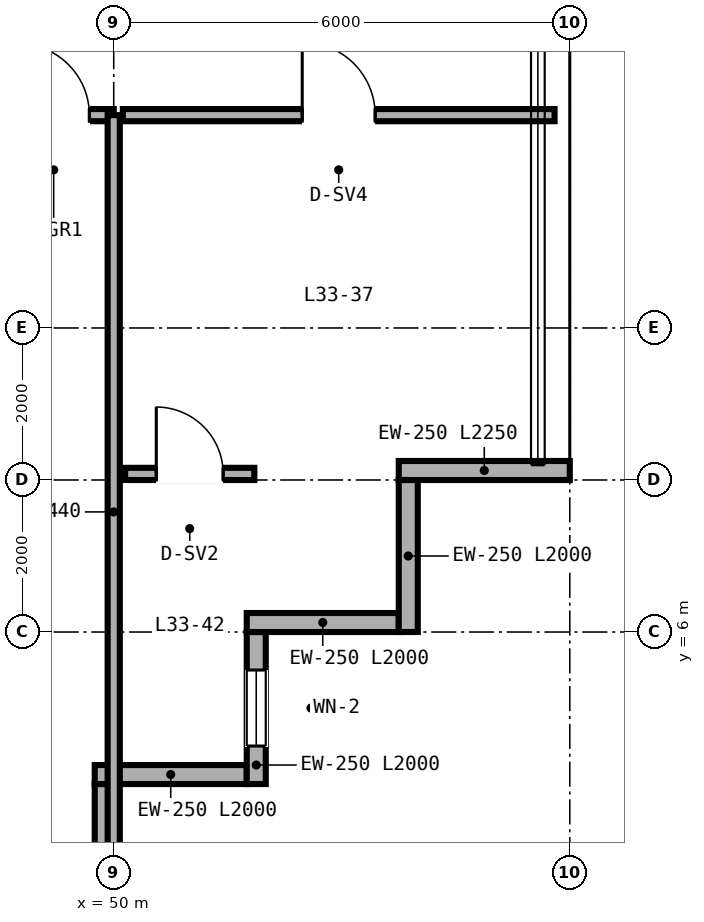
"""IFC4 building model, lengths in metres.
Left out: names, types, materials, properties, quantities, classifications, styles, units other than length and angle.
Written with IfcOpenShell. Run it as: python <this file> out.ifc"""

import sys

from ifc_helpers import new_model, si_unit, direction, frame, frame_2d, origin, place, context, subcontext, project, spatial, rectangle, extrude, source, transform, mapped, element, fill, save


model = new_model("IFC4")
c1 = context("Model", 3, precision=1e-05, world=origin(), true_north=direction((0.0, 1.0)))
c2 = subcontext(c1, "Body", "Model", "MODEL_VIEW")
j1 = project(units=[si_unit("LENGTHUNIT", "METRE"), si_unit("PLANEANGLEUNIT", "RADIAN")], contexts=[c1])
p1 = place(None, origin())
s1 = spatial("IfcSite", under=j1, at=p1, CompositionType="ELEMENT")
p2 = place(p1, origin())
s2 = spatial("IfcBuilding", under=s1, at=p2, CompositionType="ELEMENT")
p3 = place(p2, frame((0.0, 0.0, 133.2)))
s3 = spatial("IfcBuildingStorey", under=s2, at=p3, CompositionType="ELEMENT", Elevation=133.2)
p4 = place(p3, frame((49.875, 2.0, 0.0), z_axis=(0.0, 0.0, 1.0), x_axis=(0.0, 1.0, 0.0)))
e1 = element("IfcWall", 1, at=p4, inside=s3, PredefinedType="SOLIDWALL", context=c2, shape_type="SweptSolid", body=[
    extrude(rectangle(XDim=2.0, YDim=0.25, at=frame_2d((1.0, 0.0))), origin(), (0.0, 0.0, 1.0), 2.667),
])
p5 = place(p3, frame((49.75, 4.125, 0.0), z_axis=(0.0, 0.0, 1.0), x_axis=(1.0, 0.0, 0.0)))
e2 = element("IfcWall", 2, at=p5, inside=s3, PredefinedType="SOLIDWALL", context=c2, shape_type="SweptSolid", body=[
    extrude(rectangle(XDim=2.0, YDim=0.25, at=frame_2d((1.0, 0.0))), origin(), (0.0, 0.0, 1.0), 3.36),
])
p6 = place(p3, frame((51.875, 4.0, 0.0), z_axis=(0.0, 0.0, 1.0), x_axis=(0.0, 1.0, 0.0)))
e3 = element("IfcWall", 3, at=p6, inside=s3, PredefinedType="SOLIDWALL", context=c2, shape_type="SweptSolid", body=[
    extrude(rectangle(XDim=2.0, YDim=0.25, at=frame_2d((1.0, 0.0))), origin(), (0.0, 0.0, 1.0), 3.36),
])
p7 = place(p6, frame((0.5, 0.0, 0.85)))
e4 = element("IfcOpeningElement", 4, at=p7, cuts=e3, PredefinedType="OPENING", context=c2, shape_type="SweptSolid", body=[
    extrude(rectangle(XDim=1.0, YDim=1.9, at=frame_2d((0.5, 0.95))), frame((0.0, 0.135, 0.0), z_axis=(0.0, -1.0, 0.0), x_axis=(1.0, 0.0, 0.0)), (0.0, 0.0, 1.0), 0.27),
])
for number, where, z_axis, x_axis in (
    (5, (51.75, 6.125, 0.0), (0.0, 0.0, 1.0), (1.0, 0.0, 0.0)),
    (6, (53.875, 6.0, 0.0), (0.0, 0.0, 1.0), (0.0, 1.0, 0.0)),
):
    element("IfcWall", number, at=place(p3, frame(where, z_axis=z_axis, x_axis=x_axis)), inside=s3, PredefinedType="SOLIDWALL", context=c2, shape_type="SweptSolid", body=[
        extrude(rectangle(XDim=2.0, YDim=0.25, at=frame_2d((1.0, 0.0))), origin(), (0.0, 0.0, 1.0), 3.36),
    ])
p8 = place(p3, frame((53.75, 8.125, 0.0), z_axis=(0.0, 0.0, 1.0), x_axis=(1.0, 0.0, 0.0)))
e7 = element("IfcWall", 7, at=p8, inside=s3, PredefinedType="SOLIDWALL", context=c2, shape_type="SweptSolid", body=[
    extrude(rectangle(XDim=2.25, YDim=0.25, at=frame_2d((1.125, 0.0))), origin(), (0.0, 0.0, 1.0), 3.36),
])
p9 = place(p3, frame((50.12, 12.8, 0.0), z_axis=(0.0, 0.0, 1.0), x_axis=(1.0, 0.0, 0.0)))
e8 = element("IfcWall", 8, at=p9, inside=s3, PredefinedType="PARTITIONING", context=c2, shape_type="SweptSolid", body=[
    extrude(rectangle(XDim=5.68, YDim=0.16, at=frame_2d((2.84, 0.0))), origin(), (0.0, 0.0, 1.0), 3.36),
])
p10 = place(p9, frame((2.36, 0.0, 0.0)))
e9 = element("IfcOpeningElement", 9, at=p10, cuts=e8, PredefinedType="OPENING", context=c2, shape_type="SweptSolid", body=[
    extrude(rectangle(XDim=0.96, YDim=2.15, at=frame_2d((0.48, 1.075))), frame((0.0, 0.09, 0.0), z_axis=(0.0, -1.0, 0.0), x_axis=(1.0, 0.0, 0.0)), (0.0, 0.0, 1.0), 0.18),
])
p11 = place(p3, frame((50.15, 8.08, 0.0), z_axis=(0.0, 0.0, 1.0), x_axis=(1.0, 0.0, 0.0)))
e10 = element("IfcWall", 10, at=p11, inside=s3, PredefinedType="PARTITIONING", context=c2, shape_type="SweptSolid", body=[
    extrude(rectangle(XDim=1.7, YDim=0.16, at=frame_2d((0.85, 0.0))), origin(), (0.0, 0.0, 1.0), 3.36),
])
p12 = place(p11, frame((0.41, 0.0, 0.0)))
e11 = element("IfcOpeningElement", 11, at=p12, cuts=e10, PredefinedType="OPENING", context=c2, shape_type="SweptSolid", body=[
    extrude(rectangle(XDim=0.88, YDim=2.15, at=frame_2d((0.44, 1.075))), frame((0.0, 0.09, 0.0), z_axis=(0.0, -1.0, 0.0), x_axis=(1.0, 0.0, 0.0)), (0.0, 0.0, 1.0), 0.18),
])
p13 = place(p3, frame((14.0, 12.8, 0.0), z_axis=(0.0, 0.0, 1.0), x_axis=(1.0, 0.0, 0.0)))
e12 = element("IfcWall", 12, at=p13, inside=s3, PredefinedType="PARTITIONING", context=c2, shape_type="SweptSolid", body=[
    extrude(rectangle(XDim=36.0, YDim=0.16, at=frame_2d((18.0, 0.0))), origin(), (0.0, 0.0, 1.0), 2.581),
])
p14 = place(p13, frame((2.64, 0.0, 0.0)))
e13 = element("IfcOpeningElement", 13, at=p14, cuts=e12, PredefinedType="OPENING", context=c2, shape_type="SweptSolid", body=[
    extrude(rectangle(XDim=0.94, YDim=2.15, at=frame_2d((0.47, 1.075))), frame((0.0, 0.09, 0.0), z_axis=(0.0, -1.0, 0.0), x_axis=(1.0, 0.0, 0.0)), (0.0, 0.0, 1.0), 0.18),
])
p15 = place(p13, frame((6.54, 0.0, 0.0)))
e14 = element("IfcOpeningElement", 14, at=p15, cuts=e12, PredefinedType="OPENING", context=c2, shape_type="SweptSolid", body=[
    extrude(rectangle(XDim=0.94, YDim=2.15, at=frame_2d((0.47, 1.075))), frame((0.0, 0.09, 0.0), z_axis=(0.0, -1.0, 0.0), x_axis=(1.0, 0.0, 0.0)), (0.0, 0.0, 1.0), 0.18),
])
p16 = place(p13, frame((10.54, 0.0, 0.0)))
e15 = element("IfcOpeningElement", 15, at=p16, cuts=e12, PredefinedType="OPENING", context=c2, shape_type="SweptSolid", body=[
    extrude(rectangle(XDim=0.94, YDim=2.15, at=frame_2d((0.47, 1.075))), frame((0.0, 0.09, 0.0), z_axis=(0.0, -1.0, 0.0), x_axis=(1.0, 0.0, 0.0)), (0.0, 0.0, 1.0), 0.18),
])
p17 = place(p13, frame((14.54, 0.0, 0.0)))
e16 = element("IfcOpeningElement", 16, at=p17, cuts=e12, PredefinedType="OPENING", context=c2, shape_type="SweptSolid", body=[
    extrude(rectangle(XDim=0.94, YDim=2.15, at=frame_2d((0.47, 1.075))), frame((0.0, 0.09, 0.0), z_axis=(0.0, -1.0, 0.0), x_axis=(1.0, 0.0, 0.0)), (0.0, 0.0, 1.0), 0.18),
])
p18 = place(p13, frame((18.54, 0.0, 0.0)))
e17 = element("IfcOpeningElement", 17, at=p18, cuts=e12, PredefinedType="OPENING", context=c2, shape_type="SweptSolid", body=[
    extrude(rectangle(XDim=0.94, YDim=2.15, at=frame_2d((0.47, 1.075))), frame((0.0, 0.09, 0.0), z_axis=(0.0, -1.0, 0.0), x_axis=(1.0, 0.0, 0.0)), (0.0, 0.0, 1.0), 0.18),
])
p19 = place(p13, frame((22.54, 0.0, 0.0)))
e18 = element("IfcOpeningElement", 18, at=p19, cuts=e12, PredefinedType="OPENING", context=c2, shape_type="SweptSolid", body=[
    extrude(rectangle(XDim=0.94, YDim=2.15, at=frame_2d((0.47, 1.075))), frame((0.0, 0.09, 0.0), z_axis=(0.0, -1.0, 0.0), x_axis=(1.0, 0.0, 0.0)), (0.0, 0.0, 1.0), 0.18),
])
p20 = place(p13, frame((26.54, 0.0, 0.0)))
e19 = element("IfcOpeningElement", 19, at=p20, cuts=e12, PredefinedType="OPENING", context=c2, shape_type="SweptSolid", body=[
    extrude(rectangle(XDim=0.94, YDim=2.15, at=frame_2d((0.47, 1.075))), frame((0.0, 0.09, 0.0), z_axis=(0.0, -1.0, 0.0), x_axis=(1.0, 0.0, 0.0)), (0.0, 0.0, 1.0), 0.18),
])
p21 = place(p13, frame((30.64, 0.0, 0.0)))
e20 = element("IfcOpeningElement", 20, at=p21, cuts=e12, PredefinedType="OPENING", context=c2, shape_type="SweptSolid", body=[
    extrude(rectangle(XDim=0.94, YDim=2.15, at=frame_2d((0.47, 1.075))), frame((0.0, 0.09, 0.0), z_axis=(0.0, -1.0, 0.0), x_axis=(1.0, 0.0, 0.0)), (0.0, 0.0, 1.0), 0.18),
])
p22 = place(p13, frame((34.74, 0.0, 0.0)))
e21 = element("IfcOpeningElement", 21, at=p22, cuts=e12, PredefinedType="OPENING", context=c2, shape_type="SweptSolid", body=[
    extrude(rectangle(XDim=0.94, YDim=2.15, at=frame_2d((0.47, 1.075))), frame((0.0, 0.09, 0.0), z_axis=(0.0, -1.0, 0.0), x_axis=(1.0, 0.0, 0.0)), (0.0, 0.0, 1.0), 0.18),
])
p23 = place(p3, frame((50.0, 2.36, 0.0), z_axis=(0.0, 0.0, 1.0), x_axis=(0.0, 1.0, 0.0)))
e22 = element("IfcWall", 22, at=p23, inside=s3, PredefinedType="PARTITIONING", context=c2, shape_type="SweptSolid", body=[
    extrude(rectangle(XDim=10.44, YDim=0.16, at=frame_2d((5.22, 0.0))), origin(), (0.0, 0.0, 1.0), 2.667),
])
m1 = source(origin(), c2, "Body", "SweptSolid", [
    extrude(rectangle(XDim=1.0, YDim=1.9, at=frame_2d((0.5, 0.95))), frame((0.0, 0.03, 0.0), z_axis=(0.0, -1.0, 0.0), x_axis=(1.0, 0.0, 0.0)), (0.0, 0.0, 1.0), 0.06),
])
p24 = place(p7, origin())
e23 = element("IfcWindow", 23, at=p24, inside=s3, PartitioningType="SINGLE_PANEL", PredefinedType="WINDOW", context=c2, shape_type="MappedRepresentation", body=[
    mapped(m1, transform((0.0, 0.0, 0.0), scale=1.0)),
])
fill(e4, e23)
m2 = source(origin(), c2, "Body", "SweptSolid", [
    extrude(rectangle(XDim=0.96, YDim=2.15, at=frame_2d((0.48, 1.075))), frame((0.0, 0.025, 0.0), z_axis=(0.0, -1.0, 0.0), x_axis=(1.0, 0.0, 0.0)), (0.0, 0.0, 1.0), 0.05),
])
p25 = place(p10, origin())
e24 = element("IfcDoor", 24, at=p25, inside=s3, OperationType="SINGLE_SWING_LEFT", PredefinedType="DOOR", context=c2, shape_type="MappedRepresentation", body=[
    mapped(m2, transform((0.0, 0.0, 0.0), scale=1.0)),
])
fill(e9, e24)
m3 = source(origin(), c2, "Body", "SweptSolid", [
    extrude(rectangle(XDim=0.88, YDim=2.15, at=frame_2d((0.44, 1.075))), frame((0.0, 0.025, 0.0), z_axis=(0.0, -1.0, 0.0), x_axis=(1.0, 0.0, 0.0)), (0.0, 0.0, 1.0), 0.05),
])
p26 = place(p12, origin())
e25 = element("IfcDoor", 25, at=p26, inside=s3, OperationType="SINGLE_SWING_LEFT", PredefinedType="DOOR", context=c2, shape_type="MappedRepresentation", body=[
    mapped(m3, transform((0.0, 0.0, 0.0), scale=1.0)),
])
fill(e11, e25)
m4 = source(origin(), c2, "Body", "SweptSolid", [
    extrude(rectangle(XDim=0.94, YDim=2.15, at=frame_2d((0.47, 1.075))), frame((0.0, 0.025, 0.0), z_axis=(0.0, -1.0, 0.0), x_axis=(1.0, 0.0, 0.0)), (0.0, 0.0, 1.0), 0.05),
])
p27 = place(p22, origin())
e26 = element("IfcDoor", 26, at=p27, inside=s3, OperationType="SINGLE_SWING_LEFT", PredefinedType="DOOR", context=c2, shape_type="MappedRepresentation", body=[
    mapped(m4, transform((0.0, 0.0, 0.0), scale=1.0)),
])
fill(e21, e26)
save(model, sys.argv[1])
